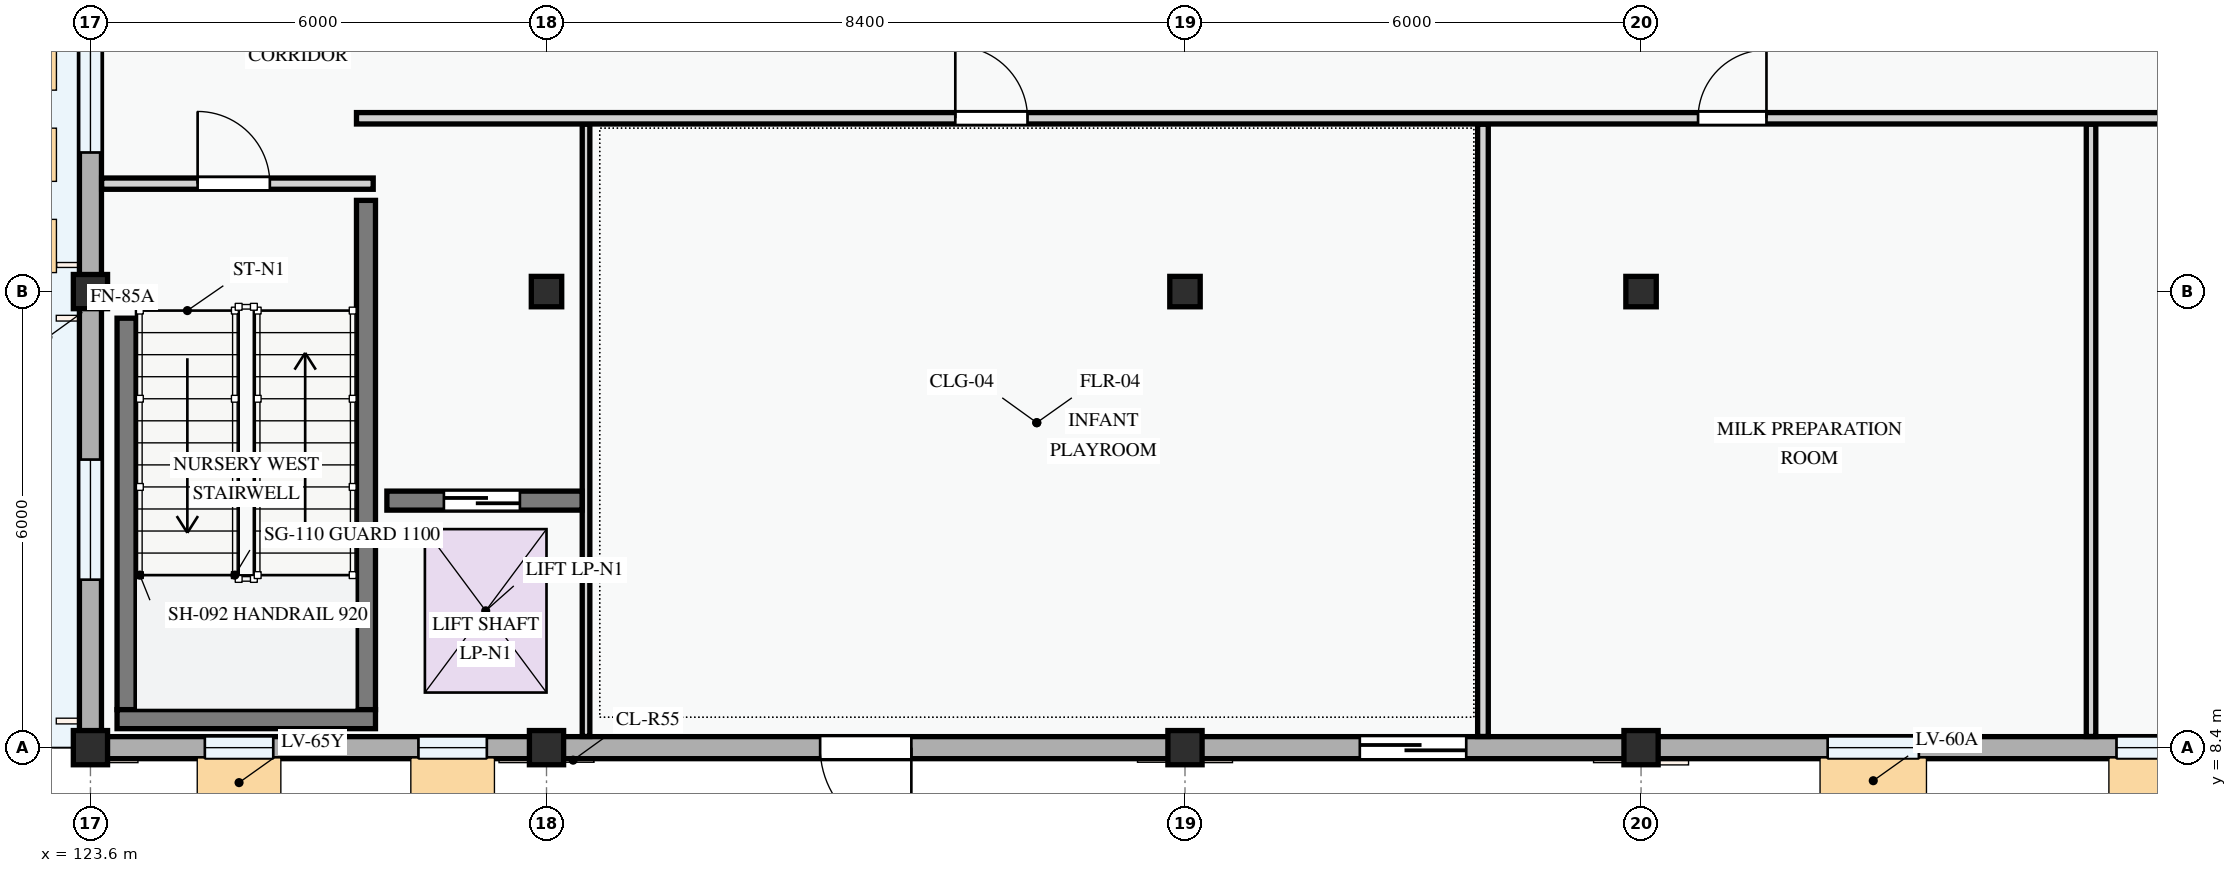
"""IFC4 building model, lengths in metres.
Left out: names, types, materials, properties, quantities, classifications, styles, units other than length and angle.
Written with IfcOpenShell. Run it as: python <this file> out.ifc"""

import sys

from ifc_helpers import new_model, si_unit, direction, frame, frame_2d, origin, origin_2d, place, context, subcontext, project, spatial, rectangle, extrude, element, fill, save


model = new_model("IFC4")
c1 = context("Model", 3, precision=1e-05, world=origin(), true_north=direction((0.0, 1.0)))
c2 = subcontext(c1, "Body", "Model", "MODEL_VIEW")
j1 = project(units=[si_unit("LENGTHUNIT", "METRE"), si_unit("PLANEANGLEUNIT", "RADIAN")], contexts=[c1])
p1 = place(None, origin())
s1 = spatial("IfcSite", under=j1, at=p1, CompositionType="ELEMENT")
p2 = place(p1, origin())
s2 = spatial("IfcBuilding", under=s1, at=p2, CompositionType="ELEMENT")
p3 = place(p2, origin())
s3 = spatial("IfcBuildingStorey", under=s2, at=p3, CompositionType="ELEMENT", Elevation=0.0)
for number, where, z_axis, x_axis in (
    (1, (123.6, 8.4, 0.0), (0.0, 0.0, 1.0), (1.0, 0.0, 0.0)),
    (2, (123.6, 14.4, 0.0), (0.0, 0.0, 1.0), (1.0, 0.0, 0.0)),
    (3, (129.6, 8.4, 0.0), (0.0, 0.0, 1.0), (1.0, 0.0, 0.0)),
):
    element("IfcColumn", number, at=place(p3, frame(where, z_axis=z_axis, x_axis=x_axis)), inside=s3, PredefinedType="COLUMN", context=c2, shape_type="SweptSolid", body=[
        extrude(rectangle(XDim=0.45, YDim=0.45, at=origin_2d()), origin(), (0.0, 0.0, 1.0), 4.5),
    ])
p4 = place(p3, frame((129.6, 14.4, 0.0), z_axis=(0.0, 0.0, 1.0), x_axis=(1.0, 0.0, 0.0)))
e4 = element("IfcColumn", 4, at=p4, inside=s3, PredefinedType="COLUMN", context=c2, shape_type="SweptSolid", body=[
    extrude(rectangle(XDim=0.4, YDim=0.4, at=origin_2d()), origin(), (0.0, 0.0, 1.0), 4.5),
])
p5 = place(p3, frame((138.0, 8.4, 0.0), z_axis=(0.0, 0.0, 1.0), x_axis=(1.0, 0.0, 0.0)))
e5 = element("IfcColumn", 5, at=p5, inside=s3, PredefinedType="COLUMN", context=c2, shape_type="SweptSolid", body=[
    extrude(rectangle(XDim=0.45, YDim=0.45, at=origin_2d()), origin(), (0.0, 0.0, 1.0), 4.5),
])
p6 = place(p3, frame((138.0, 14.4, 0.0), z_axis=(0.0, 0.0, 1.0), x_axis=(1.0, 0.0, 0.0)))
e6 = element("IfcColumn", 6, at=p6, inside=s3, PredefinedType="COLUMN", context=c2, shape_type="SweptSolid", body=[
    extrude(rectangle(XDim=0.4, YDim=0.4, at=origin_2d()), origin(), (0.0, 0.0, 1.0), 4.5),
])
p7 = place(p3, frame((144.0, 8.4, 0.0), z_axis=(0.0, 0.0, 1.0), x_axis=(1.0, 0.0, 0.0)))
e7 = element("IfcColumn", 7, at=p7, inside=s3, PredefinedType="COLUMN", context=c2, shape_type="SweptSolid", body=[
    extrude(rectangle(XDim=0.45, YDim=0.45, at=origin_2d()), origin(), (0.0, 0.0, 1.0), 4.5),
])
p8 = place(p3, frame((144.0, 14.4, 0.0), z_axis=(0.0, 0.0, 1.0), x_axis=(1.0, 0.0, 0.0)))
e8 = element("IfcColumn", 8, at=p8, inside=s3, PredefinedType="COLUMN", context=c2, shape_type="SweptSolid", body=[
    extrude(rectangle(XDim=0.4, YDim=0.4, at=origin_2d()), origin(), (0.0, 0.0, 1.0), 4.5),
])
p9 = place(p3, frame((123.6, 8.4, 0.0), z_axis=(0.0, 0.0, 1.0), x_axis=(1.0, 0.0, 0.0)))
e9 = element("IfcWall", 9, at=p9, inside=s3, PredefinedType="STANDARD", context=c2, shape_type="SweptSolid", body=[
    extrude(rectangle(XDim=6.0, YDim=0.29, at=frame_2d((3.0, 0.0))), origin(), (0.0, 0.0, 1.0), 3.585),
])
p10 = place(p9, frame((1.505, 0.0, 0.72)))
e10 = element("IfcOpeningElement", 10, at=p10, cuts=e9, PredefinedType="OPENING", context=c2, shape_type="SweptSolid", body=[
    extrude(rectangle(XDim=0.9, YDim=1.2, at=frame_2d((0.45, 0.6))), frame((0.0, 0.155, 0.0), z_axis=(0.0, -1.0, 0.0), x_axis=(1.0, 0.0, 0.0)), (0.0, 0.0, 1.0), 0.31),
])
p11 = place(p9, frame((4.315, 0.0, 0.72)))
e11 = element("IfcOpeningElement", 11, at=p11, cuts=e9, PredefinedType="OPENING", context=c2, shape_type="SweptSolid", body=[
    extrude(rectangle(XDim=0.9, YDim=1.2, at=frame_2d((0.45, 0.6))), frame((0.0, 0.155, 0.0), z_axis=(0.0, -1.0, 0.0), x_axis=(1.0, 0.0, 0.0)), (0.0, 0.0, 1.0), 0.31),
])
p12 = place(p3, frame((129.6, 8.4, 0.0), z_axis=(0.0, 0.0, 1.0), x_axis=(1.0, 0.0, 0.0)))
e12 = element("IfcWall", 12, at=p12, inside=s3, PredefinedType="STANDARD", context=c2, shape_type="SweptSolid", body=[
    extrude(rectangle(XDim=8.4, YDim=0.29, at=frame_2d((4.2, 0.0))), origin(), (0.0, 0.0, 1.0), 3.485),
])
p13 = place(p12, frame((3.6, 0.0, 0.0)))
e13 = element("IfcOpeningElement", 13, at=p13, cuts=e12, PredefinedType="OPENING", context=c2, shape_type="SweptSolid", body=[
    extrude(rectangle(XDim=1.2, YDim=2.2, at=frame_2d((0.6, 1.1))), frame((0.0, 0.155, 0.0), z_axis=(0.0, -1.0, 0.0), x_axis=(1.0, 0.0, 0.0)), (0.0, 0.0, 1.0), 0.31),
])
p14 = place(p3, frame((138.0, 8.4, 0.0), z_axis=(0.0, 0.0, 1.0), x_axis=(1.0, 0.0, 0.0)))
e14 = element("IfcWall", 14, at=p14, inside=s3, PredefinedType="STANDARD", context=c2, shape_type="SweptSolid", body=[
    extrude(rectangle(XDim=6.0, YDim=0.29, at=frame_2d((3.0, 0.0))), origin(), (0.0, 0.0, 1.0), 3.585),
])
p15 = place(p14, frame((2.3, 0.0, 0.0)))
e15 = element("IfcOpeningElement", 15, at=p15, cuts=e14, PredefinedType="OPENING", context=c2, shape_type="SweptSolid", body=[
    extrude(rectangle(XDim=1.4, YDim=2.25, at=frame_2d((0.7, 1.125))), frame((0.0, 0.155, 0.0), z_axis=(0.0, -1.0, 0.0), x_axis=(1.0, 0.0, 0.0)), (0.0, 0.0, 1.0), 0.31),
])
p16 = place(p3, frame((144.0, 8.4, 0.0), z_axis=(0.0, 0.0, 1.0), x_axis=(1.0, 0.0, 0.0)))
e16 = element("IfcWall", 16, at=p16, inside=s3, PredefinedType="STANDARD", context=c2, shape_type="SweptSolid", body=[
    extrude(rectangle(XDim=8.4, YDim=0.29, at=frame_2d((4.2, 0.0))), origin(), (0.0, 0.0, 1.0), 3.485),
])
p17 = place(p16, frame((2.455, 0.0, 0.72)))
e17 = element("IfcOpeningElement", 17, at=p17, cuts=e16, PredefinedType="OPENING", context=c2, shape_type="SweptSolid", body=[
    extrude(rectangle(XDim=1.2, YDim=1.35, at=frame_2d((0.6, 0.675))), frame((0.0, 0.155, 0.0), z_axis=(0.0, -1.0, 0.0), x_axis=(1.0, 0.0, 0.0)), (0.0, 0.0, 1.0), 0.31),
])
p18 = place(p16, frame((6.255, 0.0, 0.72)))
e18 = element("IfcOpeningElement", 18, at=p18, cuts=e16, PredefinedType="OPENING", context=c2, shape_type="SweptSolid", body=[
    extrude(rectangle(XDim=1.62, YDim=1.38, at=frame_2d((0.81, 0.69))), frame((0.0, 0.155, 0.0), z_axis=(0.0, -1.0, 0.0), x_axis=(1.0, 0.0, 0.0)), (0.0, 0.0, 1.0), 0.31),
])
p19 = place(p3, frame((123.6, 22.8, 0.0), z_axis=(0.0, 0.0, 1.0), x_axis=(0.0, -1.0, 0.0)))
e19 = element("IfcWall", 19, at=p19, inside=s3, PredefinedType="STANDARD", context=c2, shape_type="SweptSolid", body=[
    extrude(rectangle(XDim=8.4, YDim=0.29, at=frame_2d((4.2, 0.0))), origin(), (0.0, 0.0, 1.0), 3.485),
])
p20 = place(p19, frame((1.275, 0.0, 0.72)))
e20 = element("IfcOpeningElement", 20, at=p20, cuts=e19, PredefinedType="OPENING", context=c2, shape_type="SweptSolid", body=[
    extrude(rectangle(XDim=1.52, YDim=1.42, at=frame_2d((0.76, 0.71))), frame((0.0, 0.155, 0.0), z_axis=(0.0, -1.0, 0.0), x_axis=(1.0, 0.0, 0.0)), (0.0, 0.0, 1.0), 0.31),
])
p21 = place(p19, frame((4.29, 0.0, 0.72)))
e21 = element("IfcOpeningElement", 21, at=p21, cuts=e19, PredefinedType="OPENING", context=c2, shape_type="SweptSolid", body=[
    extrude(rectangle(XDim=2.28, YDim=1.46, at=frame_2d((1.14, 0.73))), frame((0.0, 0.155, 0.0), z_axis=(0.0, -1.0, 0.0), x_axis=(1.0, 0.0, 0.0)), (0.0, 0.0, 1.0), 0.31),
])
p22 = place(p3, frame((123.6, 14.4, 0.0), z_axis=(0.0, 0.0, 1.0), x_axis=(0.0, -1.0, 0.0)))
e22 = element("IfcWall", 22, at=p22, inside=s3, PredefinedType="STANDARD", context=c2, shape_type="SweptSolid", body=[
    extrude(rectangle(XDim=6.0, YDim=0.29, at=frame_2d((3.0, 0.0))), origin(), (0.0, 0.0, 1.0), 3.585),
])
p23 = place(p22, frame((2.21, 0.0, 0.72)))
e23 = element("IfcOpeningElement", 23, at=p23, cuts=e22, PredefinedType="OPENING", context=c2, shape_type="SweptSolid", body=[
    extrude(rectangle(XDim=1.58, YDim=1.48, at=frame_2d((0.79, 0.74))), frame((0.0, 0.155, 0.0), z_axis=(0.0, -1.0, 0.0), x_axis=(1.0, 0.0, 0.0)), (0.0, 0.0, 1.0), 0.31),
])
p24 = place(p3, frame((124.075, 14.05, 0.0), z_axis=(0.0, 0.0, 1.0), x_axis=(0.0, -1.0, 0.0)))
e24 = element("IfcWall", 24, at=p24, inside=s3, PredefinedType="SHEAR", context=c2, shape_type="SweptSolid", body=[
    extrude(rectangle(XDim=5.15, YDim=0.25, at=frame_2d((2.575, 0.0))), origin(), (0.0, 0.0, 1.0), 4.2),
])
p25 = place(p3, frame((127.225, 15.6, 0.0), z_axis=(0.0, 0.0, 1.0), x_axis=(0.0, -1.0, 0.0)))
e25 = element("IfcWall", 25, at=p25, inside=s3, PredefinedType="SHEAR", context=c2, shape_type="SweptSolid", body=[
    extrude(rectangle(XDim=6.7, YDim=0.25, at=frame_2d((3.35, 0.0))), origin(), (0.0, 0.0, 1.0), 4.2),
])
p26 = place(p3, frame((123.95, 8.775, 0.0), z_axis=(0.0, 0.0, 1.0), x_axis=(1.0, 0.0, 0.0)))
e26 = element("IfcWall", 26, at=p26, inside=s3, PredefinedType="SHEAR", context=c2, shape_type="SweptSolid", body=[
    extrude(rectangle(XDim=3.4, YDim=0.25, at=frame_2d((1.7, 0.0))), origin(), (0.0, 0.0, 1.0), 4.2),
])
p27 = place(p3, frame((130.12, 8.547, 0.0), z_axis=(0.0, 0.0, 1.0), x_axis=(0.0, 1.0, 0.0)))
e27 = element("IfcWall", 27, at=p27, inside=s3, PredefinedType="PARTITIONING", context=c2, shape_type="SweptSolid", body=[
    extrude(rectangle(XDim=8.056, YDim=0.1, at=frame_2d((4.028, 0.0))), origin(), (0.0, 0.0, 1.0), 4.2),
])
p28 = place(p3, frame((141.92, 8.547, 0.0), z_axis=(0.0, 0.0, 1.0), x_axis=(0.0, 1.0, 0.0)))
e28 = element("IfcWall", 28, at=p28, inside=s3, PredefinedType="PARTITIONING", context=c2, shape_type="SweptSolid", body=[
    extrude(rectangle(XDim=8.056, YDim=0.14, at=frame_2d((4.028, 0.0))), origin(), (0.0, 0.0, 1.0), 4.2),
])
p29 = place(p3, frame((149.92, 8.547, 0.0), z_axis=(0.0, 0.0, 1.0), x_axis=(0.0, 1.0, 0.0)))
e29 = element("IfcWall", 29, at=p29, inside=s3, PredefinedType="PARTITIONING", context=c2, shape_type="SweptSolid", body=[
    extrude(rectangle(XDim=8.056, YDim=0.125, at=frame_2d((4.028, 0.0))), origin(), (0.0, 0.0, 1.0), 4.2),
])
p30 = place(p3, frame((127.1, 16.68, 0.0), z_axis=(0.0, 0.0, 1.0), x_axis=(1.0, 0.0, 0.0)))
e30 = element("IfcWall", 30, at=p30, inside=s3, PredefinedType="PARTITIONING", context=c2, shape_type="SweptSolid", body=[
    extrude(rectangle(XDim=36.2, YDim=0.15, at=frame_2d((18.1, 0.0))), origin(), (0.0, 0.0, 1.0), 4.2),
])
p31 = place(p30, frame((7.878, 0.0, 0.0)))
e31 = element("IfcOpeningElement", 31, at=p31, cuts=e30, PredefinedType="OPENING", context=c2, shape_type="SweptSolid", body=[
    extrude(rectangle(XDim=0.95, YDim=2.1, at=frame_2d((0.475, 1.05))), frame((0.0, 0.085, 0.0), z_axis=(0.0, -1.0, 0.0), x_axis=(1.0, 0.0, 0.0)), (0.0, 0.0, 1.0), 0.17),
])
p32 = place(p30, frame((17.65, 0.0, 0.0)))
e32 = element("IfcOpeningElement", 32, at=p32, cuts=e30, PredefinedType="OPENING", context=c2, shape_type="SweptSolid", body=[
    extrude(rectangle(XDim=0.9, YDim=2.1, at=frame_2d((0.45, 1.05))), frame((0.0, 0.085, 0.0), z_axis=(0.0, -1.0, 0.0), x_axis=(1.0, 0.0, 0.0)), (0.0, 0.0, 1.0), 0.17),
])
p33 = place(p30, frame((25.319, 0.0, 0.0)))
e33 = element("IfcOpeningElement", 33, at=p33, cuts=e30, PredefinedType="OPENING", context=c2, shape_type="SweptSolid", body=[
    extrude(rectangle(XDim=0.9, YDim=2.1, at=frame_2d((0.45, 1.05))), frame((0.0, 0.085, 0.0), z_axis=(0.0, -1.0, 0.0), x_axis=(1.0, 0.0, 0.0)), (0.0, 0.0, 1.0), 0.17),
])
p34 = place(p30, frame((31.549, 0.0, 0.0)))
e34 = element("IfcOpeningElement", 34, at=p34, cuts=e30, PredefinedType="OPENING", context=c2, shape_type="SweptSolid", body=[
    extrude(rectangle(XDim=0.95, YDim=2.1, at=frame_2d((0.475, 1.05))), frame((0.0, 0.085, 0.0), z_axis=(0.0, -1.0, 0.0), x_axis=(1.0, 0.0, 0.0)), (0.0, 0.0, 1.0), 0.17),
])
p35 = place(p3, frame((127.5, 11.65, 0.0), z_axis=(0.0, 0.0, 1.0), x_axis=(1.0, 0.0, 0.0)))
e35 = element("IfcWall", 35, at=p35, inside=s3, PredefinedType="SHEAR", context=c2, shape_type="SweptSolid", body=[
    extrude(rectangle(XDim=2.568, YDim=0.25, at=frame_2d((1.284, 0.0))), origin(), (0.0, 0.0, 1.0), 4.2),
])
p36 = place(p35, frame((0.75, 0.0, 0.0)))
e36 = element("IfcOpeningElement", 36, at=p36, cuts=e35, PredefinedType="OPENING", context=c2, shape_type="SweptSolid", body=[
    extrude(rectangle(XDim=1.0, YDim=2.15, at=frame_2d((0.5, 1.075))), frame((0.0, 0.135, 0.0), z_axis=(0.0, -1.0, 0.0), x_axis=(1.0, 0.0, 0.0)), (0.0, 0.0, 1.0), 0.27),
])
p37 = place(p3, frame((123.747, 15.82, 0.0), z_axis=(0.0, 0.0, 1.0), x_axis=(1.0, 0.0, 0.0)))
e37 = element("IfcWall", 37, at=p37, inside=s3, PredefinedType="PARTITIONING", context=c2, shape_type="SweptSolid", body=[
    extrude(rectangle(XDim=3.573, YDim=0.148, at=frame_2d((1.787, 0.0))), origin(), (0.0, 0.0, 1.0), 4.2),
])
p38 = place(p37, frame((1.263, 0.0, 0.0)))
e38 = element("IfcOpeningElement", 38, at=p38, cuts=e37, PredefinedType="OPENING", context=c2, shape_type="SweptSolid", body=[
    extrude(rectangle(XDim=0.95, YDim=2.1, at=frame_2d((0.475, 1.05))), frame((0.0, 0.084, 0.0), z_axis=(0.0, -1.0, 0.0), x_axis=(1.0, 0.0, 0.0)), (0.0, 0.0, 1.0), 0.168),
])
p39 = place(p10, origin())
e39 = element("IfcWindow", 39, at=p39, inside=s3, PartitioningType="SINGLE_PANEL", PredefinedType="WINDOW", context=c2, shape_type="SweptSolid", body=[
    extrude(rectangle(XDim=0.9, YDim=1.2, at=frame_2d((0.45, 0.6))), frame((0.0, 0.03, 0.0), z_axis=(0.0, -1.0, 0.0), x_axis=(1.0, 0.0, 0.0)), (0.0, 0.0, 1.0), 0.06),
])
fill(e10, e39)
p40 = place(p11, origin())
e40 = element("IfcWindow", 40, at=p40, inside=s3, PartitioningType="SINGLE_PANEL", PredefinedType="WINDOW", context=c2, shape_type="SweptSolid", body=[
    extrude(rectangle(XDim=0.9, YDim=1.2, at=frame_2d((0.45, 0.6))), frame((0.0, 0.03, 0.0), z_axis=(0.0, -1.0, 0.0), x_axis=(1.0, 0.0, 0.0)), (0.0, 0.0, 1.0), 0.06),
])
fill(e11, e40)
p41 = place(p13, frame((1.2, 0.0, 0.0), z_axis=(0.0, 0.0, 1.0), x_axis=(-1.0, 0.0, 0.0)))
e41 = element("IfcDoor", 41, at=p41, inside=s3, OperationType="SINGLE_SWING_LEFT", PredefinedType="DOOR", context=c2, shape_type="SweptSolid", body=[
    extrude(rectangle(XDim=1.2, YDim=2.2, at=frame_2d((0.6, 1.1))), frame((0.0, 0.025, 0.0), z_axis=(0.0, -1.0, 0.0), x_axis=(1.0, 0.0, 0.0)), (0.0, 0.0, 1.0), 0.05),
])
fill(e13, e41)
p42 = place(p15, frame((1.4, 0.0, 0.0), z_axis=(0.0, 0.0, 1.0), x_axis=(-1.0, 0.0, 0.0)))
e42 = element("IfcDoor", 42, at=p42, inside=s3, OperationType="SLIDING_TO_LEFT", PredefinedType="DOOR", context=c2, shape_type="SweptSolid", body=[
    extrude(rectangle(XDim=1.4, YDim=2.25, at=frame_2d((0.7, 1.125))), frame((0.0, 0.025, 0.0), z_axis=(0.0, -1.0, 0.0), x_axis=(1.0, 0.0, 0.0)), (0.0, 0.0, 1.0), 0.05),
])
fill(e15, e42)
p43 = place(p17, origin())
e43 = element("IfcWindow", 43, at=p43, inside=s3, PartitioningType="SINGLE_PANEL", PredefinedType="WINDOW", context=c2, shape_type="SweptSolid", body=[
    extrude(rectangle(XDim=1.2, YDim=1.35, at=frame_2d((0.6, 0.675))), frame((0.0, 0.03, 0.0), z_axis=(0.0, -1.0, 0.0), x_axis=(1.0, 0.0, 0.0)), (0.0, 0.0, 1.0), 0.06),
])
fill(e17, e43)
p44 = place(p18, origin())
e44 = element("IfcWindow", 44, at=p44, inside=s3, PartitioningType="DOUBLE_PANEL_VERTICAL", PredefinedType="WINDOW", context=c2, shape_type="SweptSolid", body=[
    extrude(rectangle(XDim=1.62, YDim=1.38, at=frame_2d((0.81, 0.69))), frame((0.0, 0.03, 0.0), z_axis=(0.0, -1.0, 0.0), x_axis=(1.0, 0.0, 0.0)), (0.0, 0.0, 1.0), 0.06),
])
fill(e18, e44)
p45 = place(p21, origin())
e45 = element("IfcWindow", 45, at=p45, inside=s3, PartitioningType="DOUBLE_PANEL_VERTICAL", PredefinedType="WINDOW", context=c2, shape_type="SweptSolid", body=[
    extrude(rectangle(XDim=2.28, YDim=1.46, at=frame_2d((1.14, 0.73))), frame((0.0, 0.03, 0.0), z_axis=(0.0, -1.0, 0.0), x_axis=(1.0, 0.0, 0.0)), (0.0, 0.0, 1.0), 0.06),
])
fill(e21, e45)
p46 = place(p23, origin())
e46 = element("IfcWindow", 46, at=p46, inside=s3, PartitioningType="SINGLE_PANEL", PredefinedType="WINDOW", context=c2, shape_type="SweptSolid", body=[
    extrude(rectangle(XDim=1.58, YDim=1.48, at=frame_2d((0.79, 0.74))), frame((0.0, 0.03, 0.0), z_axis=(0.0, -1.0, 0.0), x_axis=(1.0, 0.0, 0.0)), (0.0, 0.0, 1.0), 0.06),
])
fill(e23, e46)
p47 = place(p31, origin())
e47 = element("IfcDoor", 47, at=p47, inside=s3, OperationType="SINGLE_SWING_LEFT", PredefinedType="DOOR", context=c2, shape_type="SweptSolid", body=[
    extrude(rectangle(XDim=0.95, YDim=2.1, at=frame_2d((0.475, 1.05))), frame((0.0, 0.025, 0.0), z_axis=(0.0, -1.0, 0.0), x_axis=(1.0, 0.0, 0.0)), (0.0, 0.0, 1.0), 0.05),
])
fill(e31, e47)
p48 = place(p32, origin())
e48 = element("IfcDoor", 48, at=p48, inside=s3, OperationType="SINGLE_SWING_RIGHT", PredefinedType="DOOR", context=c2, shape_type="SweptSolid", body=[
    extrude(rectangle(XDim=0.9, YDim=2.1, at=frame_2d((0.45, 1.05))), frame((0.0, 0.025, 0.0), z_axis=(0.0, -1.0, 0.0), x_axis=(1.0, 0.0, 0.0)), (0.0, 0.0, 1.0), 0.05),
])
fill(e32, e48)
p49 = place(p36, origin())
e49 = element("IfcDoor", 49, at=p49, inside=s3, OperationType="SLIDING_TO_LEFT", PredefinedType="DOOR", context=c2, shape_type="SweptSolid", body=[
    extrude(rectangle(XDim=1.0, YDim=2.15, at=frame_2d((0.5, 1.075))), frame((0.0, 0.025, 0.0), z_axis=(0.0, -1.0, 0.0), x_axis=(1.0, 0.0, 0.0)), (0.0, 0.0, 1.0), 0.05),
])
fill(e36, e49)
p50 = place(p38, origin())
e50 = element("IfcDoor", 50, at=p50, inside=s3, OperationType="SINGLE_SWING_LEFT", PredefinedType="DOOR", context=c2, shape_type="SweptSolid", body=[
    extrude(rectangle(XDim=0.95, YDim=2.1, at=frame_2d((0.475, 1.05))), frame((0.0, 0.025, 0.0), z_axis=(0.0, -1.0, 0.0), x_axis=(1.0, 0.0, 0.0)), (0.0, 0.0, 1.0), 0.05),
])
fill(e38, e50)
save(model, sys.argv[1])
